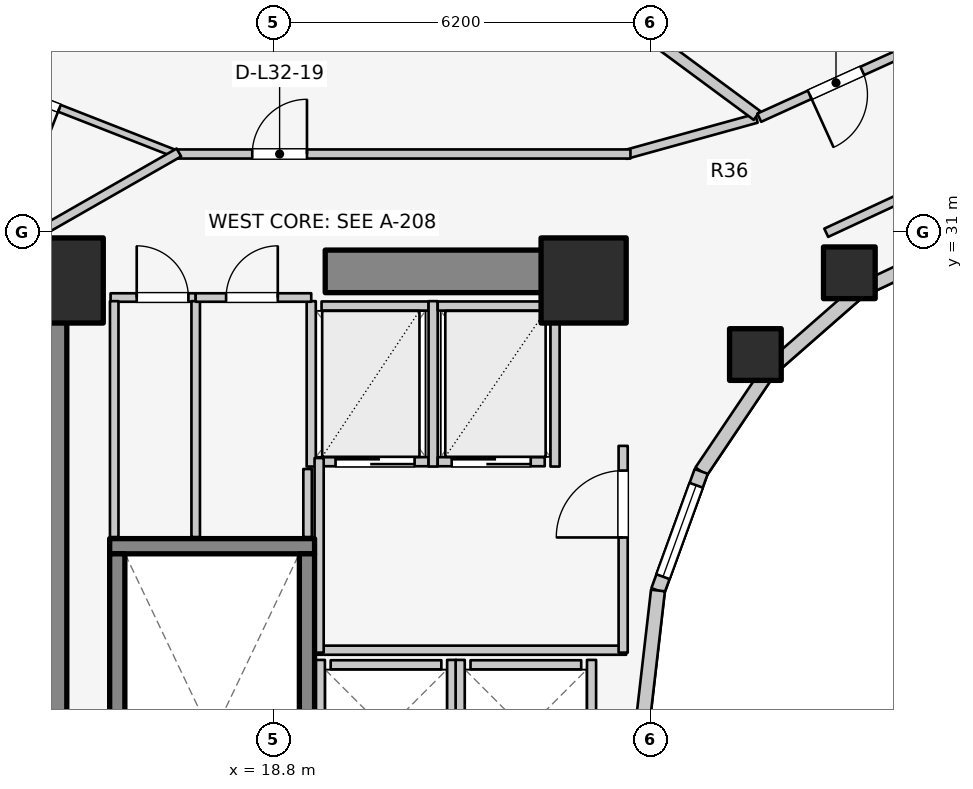
"""IFC4 building model, lengths in metres.
Left out: names, types, materials, properties, quantities, classifications, styles, units other than length and angle.
Written with IfcOpenShell. Run it as: python <this file> out.ifc"""

import sys

from ifc_helpers import new_model, si_unit, direction, frame, frame_2d, origin, origin_2d, place, context, subcontext, project, spatial, rectangle, extrude, element, fill, save


model = new_model("IFC4")
c1 = context("Model", 3, precision=1e-05, world=origin(), true_north=direction((0.0, 1.0)))
c2 = subcontext(c1, "Body", "Model", "MODEL_VIEW")
j1 = project(units=[si_unit("LENGTHUNIT", "METRE"), si_unit("PLANEANGLEUNIT", "RADIAN")], contexts=[c1])
p1 = place(None, origin())
s1 = spatial("IfcSite", under=j1, at=p1, CompositionType="ELEMENT")
p2 = place(p1, origin())
s2 = spatial("IfcBuilding", under=s1, at=p2, CompositionType="ELEMENT")
p3 = place(p2, frame((0.0, 0.0, 107.3)))
s3 = spatial("IfcBuildingStorey", under=s2, at=p3, CompositionType="ELEMENT", Elevation=107.3)
p4 = place(p3, frame((15.05, 17.05, 0.0), z_axis=(0.0, 0.0, 1.0), x_axis=(0.0, 1.0, 0.0)))
e1 = element("IfcWall", 1, at=p4, inside=s3, PredefinedType="SHEAR", context=c2, shape_type="SweptSolid", body=[
    extrude(rectangle(XDim=12.8, YDim=0.7, at=frame_2d((6.4, 0.0))), origin(), (0.0, 0.0, 1.0), 3.1),
])
p5 = place(p3, frame((19.65, 30.35, 0.0), z_axis=(0.0, 0.0, 1.0), x_axis=(1.0, 0.0, 0.0)))
e2 = element("IfcWall", 2, at=p5, inside=s3, PredefinedType="SHEAR", context=c2, shape_type="SweptSolid", body=[
    extrude(rectangle(XDim=4.5, YDim=0.7, at=frame_2d((2.25, 0.0))), origin(), (0.0, 0.0, 1.0), 3.1),
])
p6 = place(p3, frame((16.105, 25.83, 0.0), z_axis=(0.0, 0.0, 1.0), x_axis=(1.0, 0.0, 0.0)))
e3 = element("IfcWall", 3, at=p6, inside=s3, PredefinedType="SOLIDWALL", context=c2, shape_type="SweptSolid", body=[
    extrude(rectangle(XDim=3.37, YDim=0.25, at=frame_2d((1.685, 0.0))), origin(), (0.0, 0.0, 1.0), 3.1),
])
for number, where, z_axis, x_axis in (
    (4, (16.23, 17.895, 0.0), (0.0, 0.0, 1.0), (0.0, 1.0, 0.0)),
    (5, (19.35, 17.895, 0.0), (0.0, 0.0, 1.0), (0.0, 1.0, 0.0)),
):
    element("IfcWall", number, at=place(p3, frame(where, z_axis=z_axis, x_axis=x_axis)), inside=s3, PredefinedType="SOLIDWALL", context=c2, shape_type="SweptSolid", body=[
        extrude(rectangle(XDim=7.81, YDim=0.25, at=frame_2d((3.905, 0.0))), origin(), (0.0, 0.0, 1.0), 3.1),
    ])
for number, where, z_axis, x_axis in (
    (6, (23.9, 30.2, 0.0), (0.0, 0.0, 1.0), (1.0, 0.0, 0.0)),
    (7, (15.3, 30.2, 0.0), (0.0, 0.0, 1.0), (1.0, 0.0, 0.0)),
):
    element("IfcColumn", number, at=place(p3, frame(where, z_axis=z_axis, x_axis=x_axis)), inside=s3, PredefinedType="COLUMN", context=c2, shape_type="SweptSolid", body=[
        extrude(rectangle(XDim=1.4, YDim=1.4, at=origin_2d()), origin(), (0.0, 0.0, 1.0), 3.1),
    ])
for number, where, z_axis, x_axis in (
    (8, (28.27, 30.327, 0.0), (0.0, 0.0, 1.0), (1.0, 0.0, 0.0)),
    (9, (26.725, 28.982, 0.0), (0.0, 0.0, 1.0), (1.0, 0.0, 0.0)),
):
    element("IfcColumn", number, at=place(p3, frame(where, z_axis=z_axis, x_axis=x_axis)), inside=s3, PredefinedType="COLUMN", context=c2, shape_type="SweptSolid", body=[
        extrude(rectangle(XDim=0.85, YDim=0.85, at=origin_2d()), origin(), (0.0, 0.0, 1.0), 3.1),
    ])
p7 = place(p3, frame((30.157, 30.843, 0.0), z_axis=(0.0, 0.0, 1.0), x_axis=(-0.904179699603, -0.427152280606, 0.0)))
e10 = element("IfcWall", 10, at=p7, inside=s3, PredefinedType="STANDARD", context=c2, shape_type="SweptSolid", body=[
    extrude(rectangle(XDim=1.899, YDim=0.23, at=frame_2d((0.95, 0.0))), origin(), (0.0, 0.0, 1.0), 2.16),
])
p8 = place(p3, frame((28.44, 30.032, 0.0), z_axis=(0.0, 0.0, 1.0), x_axis=(-0.752576694707, -0.658504607869, 0.0)))
e11 = element("IfcWall", 11, at=p8, inside=s3, PredefinedType="STANDARD", context=c2, shape_type="SweptSolid", body=[
    extrude(rectangle(XDim=1.959, YDim=0.23, at=frame_2d((0.98, 0.0))), origin(), (0.0, 0.0, 1.0), 2.16),
])
p9 = place(p3, frame((26.965, 28.742, 0.0), z_axis=(0.0, 0.0, 1.0), x_axis=(-0.558197800898, -0.829707909492, 0.0)))
e12 = element("IfcWall", 12, at=p9, inside=s3, PredefinedType="STANDARD", context=c2, shape_type="SweptSolid", body=[
    extrude(rectangle(XDim=2.027, YDim=0.23, at=frame_2d((1.013, 0.0))), origin(), (0.0, 0.0, 1.0), 2.16),
])
p10 = place(p3, frame((25.834, 27.06, 0.0), z_axis=(0.0, 0.0, 1.0), x_axis=(-0.341423187295, -0.93990968033, 0.0)))
e13 = element("IfcWall", 13, at=p10, inside=s3, PredefinedType="STANDARD", context=c2, shape_type="SweptSolid", body=[
    extrude(rectangle(XDim=2.084, YDim=0.23, at=frame_2d((1.042, 0.0))), origin(), (0.0, 0.0, 1.0), 2.84),
])
p11 = place(p10, frame((0.242, 0.0, 0.85)))
e14 = element("IfcOpeningElement", 14, at=p11, cuts=e13, PredefinedType="OPENING", context=c2, shape_type="SweptSolid", body=[
    extrude(rectangle(XDim=1.6, YDim=1.65, at=frame_2d((0.8, 0.825))), frame((0.0, 0.125, 0.0), z_axis=(0.0, -1.0, 0.0), x_axis=(1.0, 0.0, 0.0)), (0.0, 0.0, 1.0), 0.25),
])
p12 = place(p3, frame((25.123, 25.102, 0.0), z_axis=(0.0, 0.0, 1.0), x_axis=(-0.114711713601, -0.993398823617, 0.0)))
e15 = element("IfcWall", 15, at=p12, inside=s3, PredefinedType="STANDARD", context=c2, shape_type="SweptSolid", body=[
    extrude(rectangle(XDim=2.115, YDim=0.23, at=frame_2d((1.058, 0.0))), origin(), (0.0, 0.0, 1.0), 2.84),
])
p13 = place(p3, frame((19.74, 23.88, 0.0), z_axis=(0.0, 0.0, 1.0), x_axis=(1.0, 0.0, 0.0)))
e16 = element("IfcWall", 16, at=p13, inside=s3, PredefinedType="SOLIDWALL", context=c2, shape_type="SweptSolid", body=[
    extrude(rectangle(XDim=1.82, YDim=0.15, at=frame_2d((0.91, 0.0))), origin(), (0.0, 0.0, 1.0), 2.855),
])
for number, where, z_axis, x_axis in (
    (17, (19.57, 21.64, 0.0), (0.0, 0.0, 1.0), (0.0, 1.0, 0.0)),
    (18, (21.73, 21.64, 0.0), (0.0, 0.0, 1.0), (0.0, 1.0, 0.0)),
):
    element("IfcWall", number, at=place(p3, frame(where, z_axis=z_axis, x_axis=x_axis)), inside=s3, PredefinedType="SOLIDWALL", context=c2, shape_type="SweptSolid", body=[
        extrude(rectangle(XDim=2.32, YDim=0.15, at=frame_2d((1.16, 0.0))), origin(), (0.0, 0.0, 1.0), 2.855),
    ])
p14 = place(p3, frame((22.04, 23.88, 0.0), z_axis=(0.0, 0.0, 1.0), x_axis=(1.0, 0.0, 0.0)))
e19 = element("IfcWall", 19, at=p14, inside=s3, PredefinedType="SOLIDWALL", context=c2, shape_type="SweptSolid", body=[
    extrude(rectangle(XDim=1.82, YDim=0.15, at=frame_2d((0.91, 0.0))), origin(), (0.0, 0.0, 1.0), 2.12),
])
p15 = place(p3, frame((21.87, 21.64, 0.0), z_axis=(0.0, 0.0, 1.0), x_axis=(0.0, 1.0, 0.0)))
e20 = element("IfcWall", 20, at=p15, inside=s3, PredefinedType="SOLIDWALL", context=c2, shape_type="SweptSolid", body=[
    extrude(rectangle(XDim=2.32, YDim=0.15, at=frame_2d((1.16, 0.0))), origin(), (0.0, 0.0, 1.0), 2.855),
])
p16 = place(p3, frame((24.03, 21.64, 0.0), z_axis=(0.0, 0.0, 1.0), x_axis=(0.0, 1.0, 0.0)))
e21 = element("IfcWall", 21, at=p16, inside=s3, PredefinedType="SOLIDWALL", context=c2, shape_type="SweptSolid", body=[
    extrude(rectangle(XDim=2.32, YDim=0.15, at=frame_2d((1.16, 0.0))), origin(), (0.0, 0.0, 1.0), 2.12),
])
p17 = place(p3, frame((19.59, 27.22, 0.0), z_axis=(0.0, 0.0, 1.0), x_axis=(1.0, 0.0, 0.0)))
e22 = element("IfcWall", 22, at=p17, inside=s3, PredefinedType="SOLIDWALL", context=c2, shape_type="SweptSolid", body=[
    extrude(rectangle(XDim=1.76, YDim=0.15, at=frame_2d((0.88, 0.0))), origin(), (0.0, 0.0, 1.0), 2.855),
])
p18 = place(p17, frame((0.23, 0.0, 0.0)))
e23 = element("IfcOpeningElement", 23, at=p18, cuts=e22, PredefinedType="OPENING", context=c2, shape_type="SweptSolid", body=[
    extrude(rectangle(XDim=1.3, YDim=2.1, at=frame_2d((0.65, 1.05))), frame((0.0, 0.085, 0.0), z_axis=(0.0, -1.0, 0.0), x_axis=(1.0, 0.0, 0.0)), (0.0, 0.0, 1.0), 0.17),
])
p19 = place(p3, frame((19.59, 29.78, 0.0), z_axis=(0.0, 0.0, 1.0), x_axis=(1.0, 0.0, 0.0)))
e24 = element("IfcWall", 24, at=p19, inside=s3, PredefinedType="SOLIDWALL", context=c2, shape_type="SweptSolid", body=[
    extrude(rectangle(XDim=1.76, YDim=0.15, at=frame_2d((0.88, 0.0))), origin(), (0.0, 0.0, 1.0), 2.855),
])
for number, where, z_axis, x_axis in (
    (25, (19.42, 27.14, 0.0), (0.0, 0.0, 1.0), (0.0, 1.0, 0.0)),
    (26, (21.425, 27.14, 0.0), (0.0, 0.0, 1.0), (0.0, 1.0, 0.0)),
):
    element("IfcWall", number, at=place(p3, frame(where, z_axis=z_axis, x_axis=x_axis)), inside=s3, PredefinedType="SOLIDWALL", context=c2, shape_type="SweptSolid", body=[
        extrude(rectangle(XDim=2.72, YDim=0.15, at=frame_2d((1.36, 0.0))), origin(), (0.0, 0.0, 1.0), 2.855),
    ])
p20 = place(p3, frame((21.5, 27.22, 0.0), z_axis=(0.0, 0.0, 1.0), x_axis=(1.0, 0.0, 0.0)))
e27 = element("IfcWall", 27, at=p20, inside=s3, PredefinedType="SOLIDWALL", context=c2, shape_type="SweptSolid", body=[
    extrude(rectangle(XDim=1.76, YDim=0.15, at=frame_2d((0.88, 0.0))), origin(), (0.0, 0.0, 1.0), 2.855),
])
p21 = place(p20, frame((0.23, 0.0, 0.0)))
e28 = element("IfcOpeningElement", 28, at=p21, cuts=e27, PredefinedType="OPENING", context=c2, shape_type="SweptSolid", body=[
    extrude(rectangle(XDim=1.3, YDim=2.1, at=frame_2d((0.65, 1.05))), frame((0.0, 0.085, 0.0), z_axis=(0.0, -1.0, 0.0), x_axis=(1.0, 0.0, 0.0)), (0.0, 0.0, 1.0), 0.17),
])
p22 = place(p3, frame((21.5, 29.78, 0.0), z_axis=(0.0, 0.0, 1.0), x_axis=(1.0, 0.0, 0.0)))
e29 = element("IfcWall", 29, at=p22, inside=s3, PredefinedType="SOLIDWALL", context=c2, shape_type="SweptSolid", body=[
    extrude(rectangle(XDim=1.76, YDim=0.15, at=frame_2d((0.88, 0.0))), origin(), (0.0, 0.0, 1.0), 2.855),
])
p23 = place(p3, frame((23.43, 27.14, 0.0), z_axis=(0.0, 0.0, 1.0), x_axis=(0.0, 1.0, 0.0)))
e30 = element("IfcWall", 30, at=p23, inside=s3, PredefinedType="SOLIDWALL", context=c2, shape_type="SweptSolid", body=[
    extrude(rectangle(XDim=2.72, YDim=0.15, at=frame_2d((1.36, 0.0))), origin(), (0.0, 0.0, 1.0), 2.855),
])
p24 = place(p3, frame((19.52, 24.12, 0.0), z_axis=(0.0, 0.0, 1.0), x_axis=(1.0, 0.0, 0.0)))
e31 = element("IfcWall", 31, at=p24, inside=s3, PredefinedType="PARTITIONING", context=c2, shape_type="SweptSolid", body=[
    extrude(rectangle(XDim=5.08, YDim=0.15, at=frame_2d((2.54, 0.0))), origin(), (0.0, 0.0, 1.0), 2.12),
])
p25 = place(p3, frame((19.55, 24.08, 0.0), z_axis=(0.0, 0.0, 1.0), x_axis=(0.0, 1.0, 0.0)))
e32 = element("IfcWall", 32, at=p25, inside=s3, PredefinedType="PARTITIONING", context=c2, shape_type="SweptSolid", body=[
    extrude(rectangle(XDim=3.2, YDim=0.15, at=frame_2d((1.6, 0.0))), origin(), (0.0, 0.0, 1.0), 2.855),
])
p26 = place(p3, frame((24.55, 24.08, 0.0), z_axis=(0.0, 0.0, 1.0), x_axis=(0.0, 1.0, 0.0)))
e33 = element("IfcWall", 33, at=p26, inside=s3, PredefinedType="PARTITIONING", context=c2, shape_type="SweptSolid", body=[
    extrude(rectangle(XDim=3.4, YDim=0.15, at=frame_2d((1.7, 0.0))), origin(), (0.0, 0.0, 1.0), 2.855),
])
p27 = place(p26, frame((1.894, 0.0, 0.0)))
e34 = element("IfcOpeningElement", 34, at=p27, cuts=e33, PredefinedType="OPENING", context=c2, shape_type="SweptSolid", body=[
    extrude(rectangle(XDim=1.1, YDim=2.1, at=frame_2d((0.55, 1.05))), frame((0.0, 0.085, 0.0), z_axis=(0.0, -1.0, 0.0), x_axis=(1.0, 0.0, 0.0)), (0.0, 0.0, 1.0), 0.17),
])
p28 = place(p3, frame((16.12, 29.92, 0.0), z_axis=(0.0, 0.0, 1.0), x_axis=(1.0, 0.0, 0.0)))
e35 = element("IfcWall", 35, at=p28, inside=s3, PredefinedType="PLUMBINGWALL", context=c2, shape_type="SweptSolid", body=[
    extrude(rectangle(XDim=1.4, YDim=0.14, at=frame_2d((0.7, 0.0))), origin(), (0.0, 0.0, 1.0), 2.855),
])
p29 = place(p28, frame((0.43, 0.0, 0.0)))
e36 = element("IfcOpeningElement", 36, at=p29, cuts=e35, PredefinedType="OPENING", context=c2, shape_type="SweptSolid", body=[
    extrude(rectangle(XDim=0.85, YDim=2.05, at=frame_2d((0.425, 1.025))), frame((0.0, 0.08, 0.0), z_axis=(0.0, -1.0, 0.0), x_axis=(1.0, 0.0, 0.0)), (0.0, 0.0, 1.0), 0.16),
])
for number, where, z_axis, x_axis in (
    (37, (16.18, 25.98, 0.0), (0.0, 0.0, 1.0), (0.0, 1.0, 0.0)),
    (38, (17.52, 25.98, 0.0), (0.0, 0.0, 1.0), (0.0, 1.0, 0.0)),
):
    element("IfcWall", number, at=place(p3, frame(where, z_axis=z_axis, x_axis=x_axis)), inside=s3, PredefinedType="PLUMBINGWALL", context=c2, shape_type="SweptSolid", body=[
        extrude(rectangle(XDim=3.88, YDim=0.14, at=frame_2d((1.94, 0.0))), origin(), (0.0, 0.0, 1.0), 2.855),
    ])
p30 = place(p3, frame((17.52, 29.92, 0.0), z_axis=(0.0, 0.0, 1.0), x_axis=(1.0, 0.0, 0.0)))
e39 = element("IfcWall", 39, at=p30, inside=s3, PredefinedType="PLUMBINGWALL", context=c2, shape_type="SweptSolid", body=[
    extrude(rectangle(XDim=1.9, YDim=0.14, at=frame_2d((0.95, 0.0))), origin(), (0.0, 0.0, 1.0), 2.855),
])
p31 = place(p30, frame((0.5, 0.0, 0.0)))
e40 = element("IfcOpeningElement", 40, at=p31, cuts=e39, PredefinedType="OPENING", context=c2, shape_type="SweptSolid", body=[
    extrude(rectangle(XDim=0.85, YDim=2.05, at=frame_2d((0.425, 1.025))), frame((0.0, 0.08, 0.0), z_axis=(0.0, -1.0, 0.0), x_axis=(1.0, 0.0, 0.0)), (0.0, 0.0, 1.0), 0.16),
])
p32 = place(p3, frame((19.36, 25.98, 0.0), z_axis=(0.0, 0.0, 1.0), x_axis=(0.0, 1.0, 0.0)))
e41 = element("IfcWall", 41, at=p32, inside=s3, PredefinedType="PLUMBINGWALL", context=c2, shape_type="SweptSolid", body=[
    extrude(rectangle(XDim=1.12, YDim=0.14, at=frame_2d((0.56, 0.0))), origin(), (0.0, 0.0, 1.0), 2.855),
])
p33 = place(p3, frame((29.873, 31.906, 0.0), z_axis=(0.0, 0.0, 1.0), x_axis=(-0.906943449489, -0.421252393975, 0.0)))
e42 = element("IfcWall", 42, at=p33, inside=s3, PredefinedType="PARTITIONING", context=c2, shape_type="SweptSolid", body=[
    extrude(rectangle(XDim=2.186, YDim=0.15, at=frame_2d((1.093, 0.0))), origin(), (0.0, 0.0, 1.0), 2.272),
])
p34 = place(p3, frame((17.247, 32.262, 0.0), z_axis=(0.0, 0.0, 1.0), x_axis=(-0.931226461187, 0.364441048711, 0.0)))
e43 = element("IfcWall", 43, at=p34, inside=s3, PredefinedType="MOVABLE", context=c2, shape_type="SweptSolid", body=[
    extrude(rectangle(XDim=5.077, YDim=0.12, at=frame_2d((2.539, 0.0))), origin(), (0.0, 0.0, 1.0), 2.142),
])
p35 = place(p34, frame((2.114, 0.0, 0.0)))
e44 = element("IfcOpeningElement", 44, at=p35, cuts=e43, PredefinedType="OPENING", context=c2, shape_type="SweptSolid", body=[
    extrude(rectangle(XDim=0.85, YDim=2.05, at=frame_2d((0.425, 1.025))), frame((0.0, 0.07, 0.0), z_axis=(0.0, -1.0, 0.0), x_axis=(1.0, 0.0, 0.0)), (0.0, 0.0, 1.0), 0.14),
])
p36 = place(p3, frame((26.742, 32.867, 0.0), z_axis=(0.0, 0.0, 1.0), x_axis=(-0.963833843713, -0.266503886865, 0.0)))
e45 = element("IfcWall", 45, at=p36, inside=s3, PredefinedType="PARTITIONING", context=c2, shape_type="SweptSolid", body=[
    extrude(rectangle(XDim=2.232, YDim=0.15, at=frame_2d((1.116, 0.0))), origin(), (0.0, 0.0, 1.0), 2.272),
])
p37 = place(p3, frame((17.15, 32.28, 0.0), z_axis=(0.0, 0.0, 1.0), x_axis=(1.0, 0.0, 0.0)))
e46 = element("IfcWall", 46, at=p37, inside=s3, PredefinedType="PARTITIONING", context=c2, shape_type="SweptSolid", body=[
    extrude(rectangle(XDim=7.52, YDim=0.15, at=frame_2d((3.76, 0.0))), origin(), (0.0, 0.0, 1.0), 2.272),
])
p38 = place(p37, frame((1.3, 0.0, 0.0)))
e47 = element("IfcOpeningElement", 47, at=p38, cuts=e46, PredefinedType="OPENING", context=c2, shape_type="SweptSolid", body=[
    extrude(rectangle(XDim=0.9, YDim=2.1, at=frame_2d((0.45, 1.05))), frame((0.0, 0.085, 0.0), z_axis=(0.0, -1.0, 0.0), x_axis=(1.0, 0.0, 0.0)), (0.0, 0.0, 1.0), 0.17),
])
p39 = place(p3, frame((17.243, 32.305, 0.0), z_axis=(0.0, 0.0, 1.0), x_axis=(-0.867991349648, -0.496579315857, 0.0)))
e48 = element("IfcWall", 48, at=p39, inside=s3, PredefinedType="PARTITIONING", context=c2, shape_type="SweptSolid", body=[
    extrude(rectangle(XDim=2.567, YDim=0.15, at=frame_2d((1.283, 0.0))), origin(), (0.0, 0.0, 1.0), 2.142),
])
p40 = place(p3, frame((26.751, 32.914, 0.0), z_axis=(0.0, 0.0, 1.0), x_axis=(-0.80430981394, 0.594210167533, 0.0)))
e49 = element("IfcWall", 49, at=p40, inside=s3, PredefinedType="PARTITIONING", context=c2, shape_type="SweptSolid", body=[
    extrude(rectangle(XDim=9.146, YDim=0.18, at=frame_2d((4.573, 0.0))), origin(), (0.0, 0.0, 1.0), 2.272),
])
p41 = place(p3, frame((29.313, 34.023, 0.0), z_axis=(0.0, 0.0, 1.0), x_axis=(-0.910568469686, -0.41335827319, 0.0)))
e50 = element("IfcWall", 50, at=p41, inside=s3, PredefinedType="PARTITIONING", context=c2, shape_type="SweptSolid", body=[
    extrude(rectangle(XDim=2.772, YDim=0.15, at=frame_2d((1.386, 0.0))), origin(), (0.0, 0.0, 1.0), 2.272),
])
p42 = place(p41, frame((0.911, 0.0, 0.0)))
e51 = element("IfcOpeningElement", 51, at=p42, cuts=e50, PredefinedType="OPENING", context=c2, shape_type="SweptSolid", body=[
    extrude(rectangle(XDim=0.95, YDim=2.1, at=frame_2d((0.475, 1.05))), frame((0.0, 0.085, 0.0), z_axis=(0.0, -1.0, 0.0), x_axis=(1.0, 0.0, 0.0)), (0.0, 0.0, 1.0), 0.17),
])
p43 = place(p11, origin())
e52 = element("IfcWindow", 52, at=p43, inside=s3, PartitioningType="SINGLE_PANEL", PredefinedType="WINDOW", context=c2, shape_type="SweptSolid", body=[
    extrude(rectangle(XDim=1.6, YDim=1.65, at=frame_2d((0.8, 0.825))), frame((0.0, 0.03, 0.0), z_axis=(0.0, -1.0, 0.0), x_axis=(1.0, 0.0, 0.0)), (0.0, 0.0, 1.0), 0.06),
])
fill(e14, e52)
p44 = place(p18, origin())
e53 = element("IfcDoor", 53, at=p44, inside=s3, OperationType="DOUBLE_DOOR_SLIDING", PredefinedType="DOOR", context=c2, shape_type="SweptSolid", body=[
    extrude(rectangle(XDim=1.3, YDim=2.1, at=frame_2d((0.65, 1.05))), frame((0.0, 0.025, 0.0), z_axis=(0.0, -1.0, 0.0), x_axis=(1.0, 0.0, 0.0)), (0.0, 0.0, 1.0), 0.05),
])
fill(e23, e53)
p45 = place(p21, origin())
e54 = element("IfcDoor", 54, at=p45, inside=s3, OperationType="DOUBLE_DOOR_SLIDING", PredefinedType="DOOR", context=c2, shape_type="SweptSolid", body=[
    extrude(rectangle(XDim=1.3, YDim=2.1, at=frame_2d((0.65, 1.05))), frame((0.0, 0.025, 0.0), z_axis=(0.0, -1.0, 0.0), x_axis=(1.0, 0.0, 0.0)), (0.0, 0.0, 1.0), 0.05),
])
fill(e28, e54)
p46 = place(p27, origin())
e55 = element("IfcDoor", 55, at=p46, inside=s3, OperationType="SINGLE_SWING_LEFT", PredefinedType="DOOR", context=c2, shape_type="SweptSolid", body=[
    extrude(rectangle(XDim=1.1, YDim=2.1, at=frame_2d((0.55, 1.05))), frame((0.0, 0.025, 0.0), z_axis=(0.0, -1.0, 0.0), x_axis=(1.0, 0.0, 0.0)), (0.0, 0.0, 1.0), 0.05),
])
fill(e34, e55)
p47 = place(p29, origin())
e56 = element("IfcDoor", 56, at=p47, inside=s3, OperationType="SINGLE_SWING_LEFT", PredefinedType="DOOR", context=c2, shape_type="SweptSolid", body=[
    extrude(rectangle(XDim=0.85, YDim=2.05, at=frame_2d((0.425, 1.025))), frame((0.0, 0.025, 0.0), z_axis=(0.0, -1.0, 0.0), x_axis=(1.0, 0.0, 0.0)), (0.0, 0.0, 1.0), 0.05),
])
fill(e36, e56)
p48 = place(p31, origin())
e57 = element("IfcDoor", 57, at=p48, inside=s3, OperationType="SINGLE_SWING_RIGHT", PredefinedType="DOOR", context=c2, shape_type="SweptSolid", body=[
    extrude(rectangle(XDim=0.85, YDim=2.05, at=frame_2d((0.425, 1.025))), frame((0.0, 0.025, 0.0), z_axis=(0.0, -1.0, 0.0), x_axis=(1.0, 0.0, 0.0)), (0.0, 0.0, 1.0), 0.05),
])
fill(e40, e57)
p49 = place(p35, origin())
e58 = element("IfcDoor", 58, at=p49, inside=s3, OperationType="SINGLE_SWING_LEFT", PredefinedType="DOOR", context=c2, shape_type="SweptSolid", body=[
    extrude(rectangle(XDim=0.85, YDim=2.05, at=frame_2d((0.425, 1.025))), frame((0.0, 0.025, 0.0), z_axis=(0.0, -1.0, 0.0), x_axis=(1.0, 0.0, 0.0)), (0.0, 0.0, 1.0), 0.05),
])
fill(e44, e58)
p50 = place(p38, origin())
e59 = element("IfcDoor", 59, at=p50, inside=s3, OperationType="SINGLE_SWING_RIGHT", PredefinedType="DOOR", context=c2, shape_type="SweptSolid", body=[
    extrude(rectangle(XDim=0.9, YDim=2.1, at=frame_2d((0.45, 1.05))), frame((0.0, 0.025, 0.0), z_axis=(0.0, -1.0, 0.0), x_axis=(1.0, 0.0, 0.0)), (0.0, 0.0, 1.0), 0.05),
])
fill(e47, e59)
p51 = place(p42, origin())
e60 = element("IfcDoor", 60, at=p51, inside=s3, OperationType="SINGLE_SWING_RIGHT", PredefinedType="DOOR", context=c2, shape_type="SweptSolid", body=[
    extrude(rectangle(XDim=0.95, YDim=2.1, at=frame_2d((0.475, 1.05))), frame((0.0, 0.025, 0.0), z_axis=(0.0, -1.0, 0.0), x_axis=(1.0, 0.0, 0.0)), (0.0, 0.0, 1.0), 0.05),
])
fill(e51, e60)
save(model, sys.argv[1])
